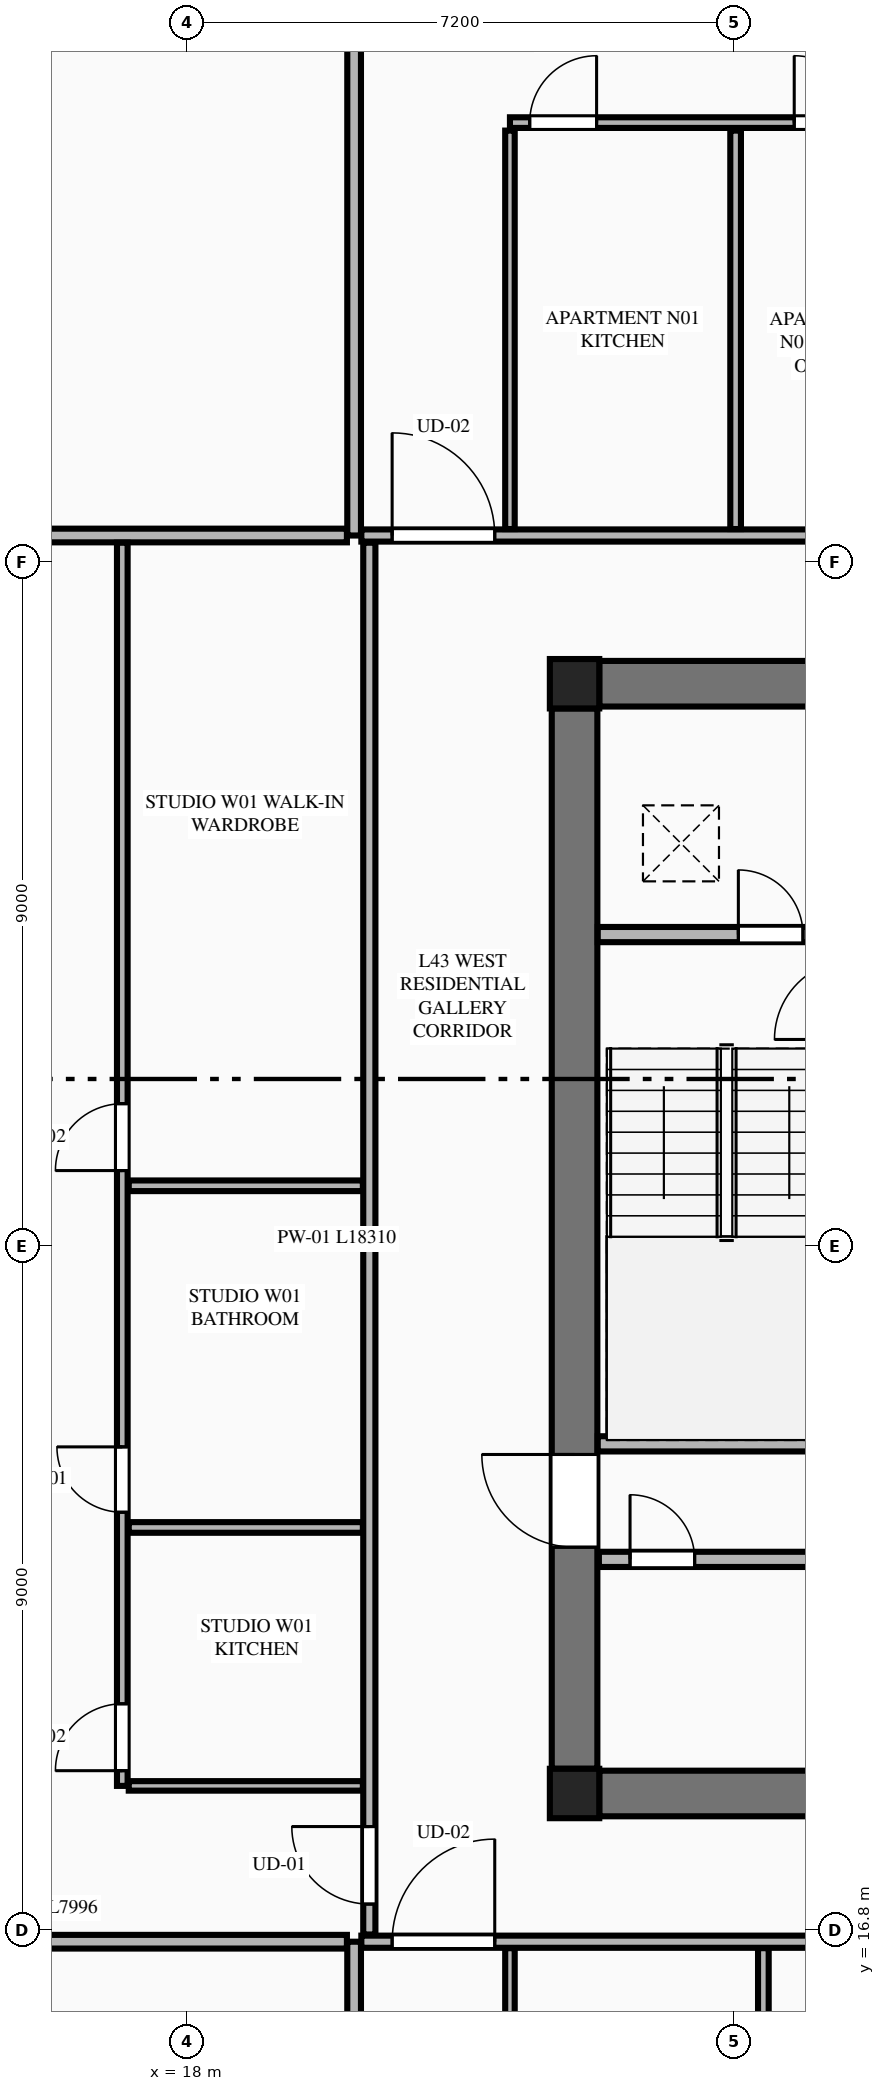
"""IFC4 building model, lengths in metres.
Left out: names, types, materials, properties, quantities, classifications, styles, units other than length and angle.
Written with IfcOpenShell. Run it as: python <this file> out.ifc"""

import sys

from ifc_helpers import new_model, si_unit, direction, frame, frame_2d, origin, origin_2d, place, context, subcontext, project, spatial, rectangle, extrude, element, fill, save


model = new_model("IFC4")
c1 = context("Model", 3, precision=1e-05, world=origin(), true_north=direction((0.0, 1.0)))
c2 = subcontext(c1, "Body", "Model", "MODEL_VIEW")
j1 = project(units=[si_unit("LENGTHUNIT", "METRE"), si_unit("PLANEANGLEUNIT", "RADIAN")], contexts=[c1])
p1 = place(None, origin())
s1 = spatial("IfcSite", under=j1, at=p1, CompositionType="ELEMENT")
p2 = place(p1, origin())
s2 = spatial("IfcBuilding", under=s1, at=p2, CompositionType="ELEMENT")
p3 = place(p2, frame((0.0, 0.0, 164.15)))
s3 = spatial("IfcBuildingStorey", under=s2, at=p3, CompositionType="ELEMENT", Elevation=164.15)
for number, where, z_axis, x_axis in (
    (1, (23.1, 18.6, 0.0), (0.0, 0.0, 1.0), (1.0, 0.0, 0.0)),
    (2, (23.1, 33.2, 0.0), (0.0, 0.0, 1.0), (1.0, 0.0, 0.0)),
):
    element("IfcColumn", number, at=place(p3, frame(where, z_axis=z_axis, x_axis=x_axis)), inside=s3, PredefinedType="COLUMN", context=c2, shape_type="SweptSolid", body=[
        extrude(rectangle(XDim=0.65, YDim=0.65, at=origin_2d()), origin(), (0.0, 0.0, 1.0), 3.55),
    ])
for number, where, z_axis, x_axis in (
    (3, (23.425, 18.6, 0.0), (0.0, 0.0, 1.0), (1.0, 0.0, 0.0)),
    (4, (23.425, 33.2, 0.0), (0.0, 0.0, 1.0), (1.0, 0.0, 0.0)),
):
    element("IfcWall", number, at=place(p3, frame(where, z_axis=z_axis, x_axis=x_axis)), inside=s3, PredefinedType="SHEAR", context=c2, shape_type="SweptSolid", body=[
        extrude(rectangle(XDim=17.95, YDim=0.6, at=frame_2d((8.975, 0.0))), origin(), (0.0, 0.0, 1.0), 3.34),
    ])
p4 = place(p3, frame((23.1, 18.925, 0.0), z_axis=(0.0, 0.0, 1.0), x_axis=(0.0, 1.0, 0.0)))
e5 = element("IfcWall", 5, at=p4, inside=s3, PredefinedType="SHEAR", context=c2, shape_type="SweptSolid", body=[
    extrude(rectangle(XDim=13.95, YDim=0.6, at=frame_2d((6.975, 0.0))), origin(), (0.0, 0.0, 1.0), 3.34),
])
p5 = place(p4, frame((2.915, 0.0, 0.0)))
e6 = element("IfcOpeningElement", 6, at=p5, cuts=e5, PredefinedType="OPENING", context=c2, shape_type="SweptSolid", body=[
    extrude(rectangle(XDim=1.22, YDim=2.25, at=frame_2d((0.61, 1.125))), frame((0.0, 0.31, 0.0), z_axis=(0.0, -1.0, 0.0), x_axis=(1.0, 0.0, 0.0)), (0.0, 0.0, 1.0), 0.62),
])
p6 = place(p3, frame((23.405, 23.2, 0.0), z_axis=(0.0, 0.0, 1.0), x_axis=(1.0, 0.0, 0.0)))
e7 = element("IfcWall", 7, at=p6, inside=s3, PredefinedType="PLUMBINGWALL", context=c2, shape_type="SweptSolid", body=[
    extrude(rectangle(XDim=3.27, YDim=0.2, at=frame_2d((1.635, 0.0))), origin(), (0.0, 0.0, 1.0), 3.34),
])
p7 = place(p3, frame((23.405, 29.9, 0.0), z_axis=(0.0, 0.0, 1.0), x_axis=(1.0, 0.0, 0.0)))
e8 = element("IfcWall", 8, at=p7, inside=s3, PredefinedType="PLUMBINGWALL", context=c2, shape_type="SweptSolid", body=[
    extrude(rectangle(XDim=3.27, YDim=0.2, at=frame_2d((1.635, 0.0))), origin(), (0.0, 0.0, 1.0), 3.34),
])
p8 = place(p7, frame((1.85, 0.0, 0.0)))
e9 = element("IfcOpeningElement", 9, at=p8, cuts=e8, PredefinedType="OPENING", context=c2, shape_type="SweptSolid", body=[
    extrude(rectangle(XDim=0.85, YDim=2.05, at=frame_2d((0.425, 1.025))), frame((0.0, 0.11, 0.0), z_axis=(0.0, -1.0, 0.0), x_axis=(1.0, 0.0, 0.0)), (0.0, 0.0, 1.0), 0.22),
])
p9 = place(p3, frame((23.42, 21.68, 0.0), z_axis=(0.0, 0.0, 1.0), x_axis=(1.0, 0.0, 0.0)))
e10 = element("IfcWall", 10, at=p9, inside=s3, PredefinedType="PLUMBINGWALL", context=c2, shape_type="SweptSolid", body=[
    extrude(rectangle(XDim=17.96, YDim=0.2, at=frame_2d((8.98, 0.0))), origin(), (0.0, 0.0, 1.0), 3.34),
])
p10 = place(p9, frame((11.6, 0.0, 0.0)))
e11 = element("IfcOpeningElement", 11, at=p10, cuts=e10, PredefinedType="OPENING", context=c2, shape_type="SweptSolid", body=[
    extrude(rectangle(XDim=1.1, YDim=2.2, at=frame_2d((0.55, 1.1))), frame((0.0, 0.11, 0.0), z_axis=(0.0, -1.0, 0.0), x_axis=(1.0, 0.0, 0.0)), (0.0, 0.0, 1.0), 0.22),
])
p11 = place(p9, frame((0.41, 0.0, 0.0)))
e12 = element("IfcOpeningElement", 12, at=p11, cuts=e10, PredefinedType="OPENING", context=c2, shape_type="SweptSolid", body=[
    extrude(rectangle(XDim=0.85, YDim=2.05, at=frame_2d((0.425, 1.025))), frame((0.0, 0.11, 0.0), z_axis=(0.0, -1.0, 0.0), x_axis=(1.0, 0.0, 0.0)), (0.0, 0.0, 1.0), 0.22),
])
p12 = place(p9, frame((4.13, 0.0, 0.0)))
e13 = element("IfcOpeningElement", 13, at=p12, cuts=e10, PredefinedType="OPENING", context=c2, shape_type="SweptSolid", body=[
    extrude(rectangle(XDim=0.85, YDim=2.05, at=frame_2d((0.425, 1.025))), frame((0.0, 0.11, 0.0), z_axis=(0.0, -1.0, 0.0), x_axis=(1.0, 0.0, 0.0)), (0.0, 0.0, 1.0), 0.22),
])
p13 = place(p9, frame((7.83, 0.0, 0.0)))
e14 = element("IfcOpeningElement", 14, at=p13, cuts=e10, PredefinedType="OPENING", context=c2, shape_type="SweptSolid", body=[
    extrude(rectangle(XDim=0.85, YDim=2.05, at=frame_2d((0.425, 1.025))), frame((0.0, 0.11, 0.0), z_axis=(0.0, -1.0, 0.0), x_axis=(1.0, 0.0, 0.0)), (0.0, 0.0, 1.0), 0.22),
])
p14 = place(p9, frame((13.78, 0.0, 0.0)))
e15 = element("IfcOpeningElement", 15, at=p14, cuts=e10, PredefinedType="OPENING", context=c2, shape_type="SweptSolid", body=[
    extrude(rectangle(XDim=0.85, YDim=2.05, at=frame_2d((0.425, 1.025))), frame((0.0, 0.11, 0.0), z_axis=(0.0, -1.0, 0.0), x_axis=(1.0, 0.0, 0.0)), (0.0, 0.0, 1.0), 0.22),
])
p15 = place(p9, frame((16.13, 0.0, 0.0)))
e16 = element("IfcOpeningElement", 16, at=p15, cuts=e10, PredefinedType="OPENING", context=c2, shape_type="SweptSolid", body=[
    extrude(rectangle(XDim=0.85, YDim=2.05, at=frame_2d((0.425, 1.025))), frame((0.0, 0.11, 0.0), z_axis=(0.0, -1.0, 0.0), x_axis=(1.0, 0.0, 0.0)), (0.0, 0.0, 1.0), 0.22),
])
p16 = place(p3, frame((16.863, 44.823, 0.0), z_axis=(0.0, 0.0, 1.0), x_axis=(-0.451595734115, -0.892222670038, 0.0)))
e17 = element("IfcWall", 17, at=p16, inside=s3, PredefinedType="STANDARD", context=c2, shape_type="SweptSolid", body=[
    extrude(rectangle(XDim=5.208, YDim=0.34, at=frame_2d((2.604, 0.0))), origin(), (0.0, 0.0, 1.0), 2.797),
])
p17 = place(p16, frame((2.054, 0.0, 0.75)))
e18 = element("IfcOpeningElement", 18, at=p17, cuts=e17, PredefinedType="OPENING", context=c2, shape_type="SweptSolid", body=[
    extrude(rectangle(XDim=1.1, YDim=1.897, at=frame_2d((0.55, 0.948))), frame((0.0, 0.18, 0.0), z_axis=(0.0, -1.0, 0.0), x_axis=(1.0, 0.0, 0.0)), (0.0, 0.0, 1.0), 0.36),
])
p18 = place(p3, frame((20.2, 4.105, 0.0), z_axis=(0.0, 0.0, 1.0), x_axis=(0.0, 1.0, 0.0)))
e19 = element("IfcWall", 19, at=p18, inside=s3, PredefinedType="PARTITIONING", context=c2, shape_type="SweptSolid", body=[
    extrude(rectangle(XDim=12.545, YDim=0.18, at=frame_2d((6.272, 0.0))), origin(), (0.0, 0.0, 1.0), 3.34),
])
p19 = place(p3, frame((20.295, 16.65, 0.0), z_axis=(0.0, 0.0, 1.0), x_axis=(1.0, 0.0, 0.0)))
e20 = element("IfcWall", 20, at=p19, inside=s3, PredefinedType="PARTITIONING", context=c2, shape_type="SweptSolid", body=[
    extrude(rectangle(XDim=24.21, YDim=0.16, at=frame_2d((12.105, 0.0))), origin(), (0.0, 0.0, 1.0), 3.34),
])
p20 = place(p19, frame((0.405, 0.0, 0.0)))
e21 = element("IfcOpeningElement", 21, at=p20, cuts=e20, PredefinedType="OPENING", context=c2, shape_type="SweptSolid", body=[
    extrude(rectangle(XDim=1.35, YDim=2.35, at=frame_2d((0.675, 1.175))), frame((0.0, 0.09, 0.0), z_axis=(0.0, -1.0, 0.0), x_axis=(1.0, 0.0, 0.0)), (0.0, 0.0, 1.0), 0.18),
])
p21 = place(p3, frame((22.25, 11.612, 0.0), z_axis=(0.0, 0.0, 1.0), x_axis=(0.0, 1.0, 0.0)))
e22 = element("IfcWall", 22, at=p21, inside=s3, PredefinedType="PARTITIONING", context=c2, shape_type="SweptSolid", body=[
    extrude(rectangle(XDim=4.953, YDim=0.125, at=frame_2d((2.477, 0.0))), origin(), (0.0, 0.0, 1.0), 2.722),
])
p22 = place(p3, frame((25.584, 11.612, 0.0), z_axis=(0.0, 0.0, 1.0), x_axis=(0.0, 1.0, 0.0)))
e23 = element("IfcWall", 23, at=p22, inside=s3, PredefinedType="PLUMBINGWALL", context=c2, shape_type="SweptSolid", body=[
    extrude(rectangle(XDim=4.953, YDim=0.14, at=frame_2d((2.477, 0.0))), origin(), (0.0, 0.0, 1.0), 3.34),
])
p23 = place(p3, frame((20.2, 35.15, 0.0), z_axis=(0.0, 0.0, 1.0), x_axis=(0.0, 1.0, 0.0)))
e24 = element("IfcWall", 24, at=p23, inside=s3, PredefinedType="PARTITIONING", context=c2, shape_type="SweptSolid", body=[
    extrude(rectangle(XDim=12.345, YDim=0.18, at=frame_2d((6.173, 0.0))), origin(), (0.0, 0.0, 1.0), 3.34),
])
p24 = place(p3, frame((20.295, 35.15, 0.0), z_axis=(0.0, 0.0, 1.0), x_axis=(1.0, 0.0, 0.0)))
e25 = element("IfcWall", 25, at=p24, inside=s3, PredefinedType="PARTITIONING", context=c2, shape_type="SweptSolid", body=[
    extrude(rectangle(XDim=24.21, YDim=0.16, at=frame_2d((12.105, 0.0))), origin(), (0.0, 0.0, 1.0), 3.34),
])
p25 = place(p24, frame((0.405, 0.0, 0.0)))
e26 = element("IfcOpeningElement", 26, at=p25, cuts=e25, PredefinedType="OPENING", context=c2, shape_type="SweptSolid", body=[
    extrude(rectangle(XDim=1.35, YDim=2.35, at=frame_2d((0.675, 1.175))), frame((0.0, 0.09, 0.0), z_axis=(0.0, -1.0, 0.0), x_axis=(1.0, 0.0, 0.0)), (0.0, 0.0, 1.0), 0.18),
])
p26 = place(p3, frame((22.25, 35.235, 0.0), z_axis=(0.0, 0.0, 1.0), x_axis=(0.0, 1.0, 0.0)))
e27 = element("IfcWall", 27, at=p26, inside=s3, PredefinedType="PARTITIONING", context=c2, shape_type="SweptSolid", body=[
    extrude(rectangle(XDim=5.242, YDim=0.125, at=frame_2d((2.621, 0.0))), origin(), (0.0, 0.0, 1.0), 2.722),
])
p27 = place(p3, frame((22.25, 40.582, 0.0), z_axis=(0.0, 0.0, 1.0), x_axis=(1.0, 0.0, 0.0)))
e28 = element("IfcWall", 28, at=p27, inside=s3, PredefinedType="PLUMBINGWALL", context=c2, shape_type="SweptSolid", body=[
    extrude(rectangle(XDim=7.812, YDim=0.14, at=frame_2d((3.906, 0.0))), origin(), (0.0, 0.0, 1.0), 3.34),
])
p28 = place(p27, frame((6.176, 0.0, 0.0)))
e29 = element("IfcOpeningElement", 29, at=p28, cuts=e28, PredefinedType="OPENING", context=c2, shape_type="SweptSolid", body=[
    extrude(rectangle(XDim=0.86, YDim=2.1, at=frame_2d((0.43, 1.05))), frame((0.0, 0.08, 0.0), z_axis=(0.0, -1.0, 0.0), x_axis=(1.0, 0.0, 0.0)), (0.0, 0.0, 1.0), 0.16),
])
p29 = place(p27, frame((0.26, 0.0, 0.0)))
e30 = element("IfcOpeningElement", 30, at=p29, cuts=e28, PredefinedType="OPENING", context=c2, shape_type="SweptSolid", body=[
    extrude(rectangle(XDim=0.88, YDim=2.15, at=frame_2d((0.44, 1.075))), frame((0.0, 0.08, 0.0), z_axis=(0.0, -1.0, 0.0), x_axis=(1.0, 0.0, 0.0)), (0.0, 0.0, 1.0), 0.16),
])
p30 = place(p27, frame((3.74, 0.0, 0.0)))
e31 = element("IfcOpeningElement", 31, at=p30, cuts=e28, PredefinedType="OPENING", context=c2, shape_type="SweptSolid", body=[
    extrude(rectangle(XDim=0.88, YDim=2.15, at=frame_2d((0.44, 1.075))), frame((0.0, 0.08, 0.0), z_axis=(0.0, -1.0, 0.0), x_axis=(1.0, 0.0, 0.0)), (0.0, 0.0, 1.0), 0.16),
])
p31 = place(p3, frame((25.219, 35.235, 0.0), z_axis=(0.0, 0.0, 1.0), x_axis=(0.0, 1.0, 0.0)))
e32 = element("IfcWall", 32, at=p31, inside=s3, PredefinedType="PLUMBINGWALL", context=c2, shape_type="SweptSolid", body=[
    extrude(rectangle(XDim=5.242, YDim=0.14, at=frame_2d((2.621, 0.0))), origin(), (0.0, 0.0, 1.0), 3.34),
])
p32 = place(p3, frame((12.109, 16.65, 0.0), z_axis=(0.0, 0.0, 1.0), x_axis=(1.0, 0.0, 0.0)))
e33 = element("IfcWall", 33, at=p32, inside=s3, PredefinedType="PARTITIONING", context=c2, shape_type="SweptSolid", body=[
    extrude(rectangle(XDim=7.996, YDim=0.18, at=frame_2d((3.998, 0.0))), origin(), (0.0, 0.0, 1.0), 3.34),
])
p33 = place(p3, frame((12.21, 35.15, 0.0), z_axis=(0.0, 0.0, 1.0), x_axis=(1.0, 0.0, 0.0)))
e34 = element("IfcWall", 34, at=p33, inside=s3, PredefinedType="PARTITIONING", context=c2, shape_type="SweptSolid", body=[
    extrude(rectangle(XDim=7.895, YDim=0.18, at=frame_2d((3.948, 0.0))), origin(), (0.0, 0.0, 1.0), 3.34),
])
p34 = place(p3, frame((20.4, 16.745, 0.0), z_axis=(0.0, 0.0, 1.0), x_axis=(0.0, 1.0, 0.0)))
e35 = element("IfcWall", 35, at=p34, inside=s3, PredefinedType="PARTITIONING", context=c2, shape_type="SweptSolid", body=[
    extrude(rectangle(XDim=18.31, YDim=0.16, at=frame_2d((9.155, 0.0))), origin(), (0.0, 0.0, 1.0), 3.34),
])
p35 = place(p34, frame((0.4, 0.0, 0.0)))
e36 = element("IfcOpeningElement", 36, at=p35, cuts=e35, PredefinedType="OPENING", context=c2, shape_type="SweptSolid", body=[
    extrude(rectangle(XDim=1.02, YDim=2.25, at=frame_2d((0.51, 1.125))), frame((0.0, 0.09, 0.0), z_axis=(0.0, -1.0, 0.0), x_axis=(1.0, 0.0, 0.0)), (0.0, 0.0, 1.0), 0.18),
])
p36 = place(p3, frame((17.235, 18.7, 0.0), z_axis=(0.0, 0.0, 1.0), x_axis=(1.0, 0.0, 0.0)))
e37 = element("IfcWall", 37, at=p36, inside=s3, PredefinedType="PARTITIONING", context=c2, shape_type="SweptSolid", body=[
    extrude(rectangle(XDim=3.08, YDim=0.125, at=frame_2d((1.54, 0.0))), origin(), (0.0, 0.0, 1.0), 2.722),
])
p37 = place(p3, frame((17.15, 18.7, 0.0), z_axis=(0.0, 0.0, 1.0), x_axis=(0.0, 1.0, 0.0)))
e38 = element("IfcWall", 38, at=p37, inside=s3, PredefinedType="PLUMBINGWALL", context=c2, shape_type="SweptSolid", body=[
    extrude(rectangle(XDim=16.355, YDim=0.14, at=frame_2d((8.177, 0.0))), origin(), (0.0, 0.0, 1.0), 3.34),
])
p38 = place(p37, frame((3.6, 0.0, 0.0)))
e39 = element("IfcOpeningElement", 39, at=p38, cuts=e38, PredefinedType="OPENING", context=c2, shape_type="SweptSolid", body=[
    extrude(rectangle(XDim=0.86, YDim=2.1, at=frame_2d((0.43, 1.05))), frame((0.0, 0.08, 0.0), z_axis=(0.0, -1.0, 0.0), x_axis=(1.0, 0.0, 0.0)), (0.0, 0.0, 1.0), 0.16),
])
p39 = place(p37, frame((8.095, 0.0, 0.0)))
e40 = element("IfcOpeningElement", 40, at=p39, cuts=e38, PredefinedType="OPENING", context=c2, shape_type="SweptSolid", body=[
    extrude(rectangle(XDim=0.88, YDim=2.15, at=frame_2d((0.44, 1.075))), frame((0.0, 0.08, 0.0), z_axis=(0.0, -1.0, 0.0), x_axis=(1.0, 0.0, 0.0)), (0.0, 0.0, 1.0), 0.16),
])
p40 = place(p37, frame((0.2, 0.0, 0.0)))
e41 = element("IfcOpeningElement", 41, at=p40, cuts=e38, PredefinedType="OPENING", context=c2, shape_type="SweptSolid", body=[
    extrude(rectangle(XDim=0.88, YDim=2.15, at=frame_2d((0.44, 1.075))), frame((0.0, 0.08, 0.0), z_axis=(0.0, -1.0, 0.0), x_axis=(1.0, 0.0, 0.0)), (0.0, 0.0, 1.0), 0.16),
])
for number, where, z_axis, x_axis in (
    (42, (17.235, 22.1, 0.0), (0.0, 0.0, 1.0), (1.0, 0.0, 0.0)),
    (43, (17.235, 26.595, 0.0), (0.0, 0.0, 1.0), (1.0, 0.0, 0.0)),
):
    element("IfcWall", number, at=place(p3, frame(where, z_axis=z_axis, x_axis=x_axis)), inside=s3, PredefinedType="PLUMBINGWALL", context=c2, shape_type="SweptSolid", body=[
        extrude(rectangle(XDim=3.08, YDim=0.14, at=frame_2d((1.54, 0.0))), origin(), (0.0, 0.0, 1.0), 3.34),
    ])
p41 = place(p5, origin())
e44 = element("IfcDoor", 44, at=p41, inside=s3, OperationType="SINGLE_SWING_RIGHT", PredefinedType="DOOR", context=c2, shape_type="SweptSolid", body=[
    extrude(rectangle(XDim=1.22, YDim=2.25, at=frame_2d((0.61, 1.125))), frame((0.0, 0.025, 0.0), z_axis=(0.0, -1.0, 0.0), x_axis=(1.0, 0.0, 0.0)), (0.0, 0.0, 1.0), 0.05),
])
fill(e6, e44)
p42 = place(p8, origin())
e45 = element("IfcDoor", 45, at=p42, inside=s3, OperationType="SINGLE_SWING_LEFT", PredefinedType="DOOR", context=c2, shape_type="SweptSolid", body=[
    extrude(rectangle(XDim=0.85, YDim=2.05, at=frame_2d((0.425, 1.025))), frame((0.0, 0.025, 0.0), z_axis=(0.0, -1.0, 0.0), x_axis=(1.0, 0.0, 0.0)), (0.0, 0.0, 1.0), 0.05),
])
fill(e9, e45)
p43 = place(p11, origin())
e46 = element("IfcDoor", 46, at=p43, inside=s3, OperationType="SINGLE_SWING_LEFT", PredefinedType="DOOR", context=c2, shape_type="SweptSolid", body=[
    extrude(rectangle(XDim=0.85, YDim=2.05, at=frame_2d((0.425, 1.025))), frame((0.0, 0.025, 0.0), z_axis=(0.0, -1.0, 0.0), x_axis=(1.0, 0.0, 0.0)), (0.0, 0.0, 1.0), 0.05),
])
fill(e12, e46)
p44 = place(p20, origin())
e47 = element("IfcDoor", 47, at=p44, inside=s3, OperationType="SINGLE_SWING_RIGHT", PredefinedType="DOOR", context=c2, shape_type="SweptSolid", body=[
    extrude(rectangle(XDim=1.35, YDim=2.35, at=frame_2d((0.675, 1.175))), frame((0.0, 0.025, 0.0), z_axis=(0.0, -1.0, 0.0), x_axis=(1.0, 0.0, 0.0)), (0.0, 0.0, 1.0), 0.05),
])
fill(e21, e47)
p45 = place(p25, origin())
e48 = element("IfcDoor", 48, at=p45, inside=s3, OperationType="SINGLE_SWING_LEFT", PredefinedType="DOOR", context=c2, shape_type="SweptSolid", body=[
    extrude(rectangle(XDim=1.35, YDim=2.35, at=frame_2d((0.675, 1.175))), frame((0.0, 0.025, 0.0), z_axis=(0.0, -1.0, 0.0), x_axis=(1.0, 0.0, 0.0)), (0.0, 0.0, 1.0), 0.05),
])
fill(e26, e48)
p46 = place(p29, origin())
e49 = element("IfcDoor", 49, at=p46, inside=s3, OperationType="SINGLE_SWING_RIGHT", PredefinedType="DOOR", context=c2, shape_type="SweptSolid", body=[
    extrude(rectangle(XDim=0.88, YDim=2.15, at=frame_2d((0.44, 1.075))), frame((0.0, 0.025, 0.0), z_axis=(0.0, -1.0, 0.0), x_axis=(1.0, 0.0, 0.0)), (0.0, 0.0, 1.0), 0.05),
])
fill(e30, e49)
p47 = place(p30, origin())
e50 = element("IfcDoor", 50, at=p47, inside=s3, OperationType="SINGLE_SWING_LEFT", PredefinedType="DOOR", context=c2, shape_type="SweptSolid", body=[
    extrude(rectangle(XDim=0.88, YDim=2.15, at=frame_2d((0.44, 1.075))), frame((0.0, 0.025, 0.0), z_axis=(0.0, -1.0, 0.0), x_axis=(1.0, 0.0, 0.0)), (0.0, 0.0, 1.0), 0.05),
])
fill(e31, e50)
p48 = place(p38, origin())
e51 = element("IfcDoor", 51, at=p48, inside=s3, OperationType="SINGLE_SWING_RIGHT", PredefinedType="DOOR", context=c2, shape_type="SweptSolid", body=[
    extrude(rectangle(XDim=0.86, YDim=2.1, at=frame_2d((0.43, 1.05))), frame((0.0, 0.025, 0.0), z_axis=(0.0, -1.0, 0.0), x_axis=(1.0, 0.0, 0.0)), (0.0, 0.0, 1.0), 0.05),
])
fill(e39, e51)
p49 = place(p39, origin())
e52 = element("IfcDoor", 52, at=p49, inside=s3, OperationType="SINGLE_SWING_LEFT", PredefinedType="DOOR", context=c2, shape_type="SweptSolid", body=[
    extrude(rectangle(XDim=0.88, YDim=2.15, at=frame_2d((0.44, 1.075))), frame((0.0, 0.025, 0.0), z_axis=(0.0, -1.0, 0.0), x_axis=(1.0, 0.0, 0.0)), (0.0, 0.0, 1.0), 0.05),
])
fill(e40, e52)
p50 = place(p35, origin())
e53 = element("IfcDoor", 53, at=p50, inside=s3, OperationType="SINGLE_SWING_RIGHT", PredefinedType="DOOR", context=c2, shape_type="SweptSolid", body=[
    extrude(rectangle(XDim=1.02, YDim=2.25, at=frame_2d((0.51, 1.125))), frame((0.0, 0.025, 0.0), z_axis=(0.0, -1.0, 0.0), x_axis=(1.0, 0.0, 0.0)), (0.0, 0.0, 1.0), 0.05),
])
fill(e36, e53)
p51 = place(p40, origin())
e54 = element("IfcDoor", 54, at=p51, inside=s3, OperationType="SINGLE_SWING_LEFT", PredefinedType="DOOR", context=c2, shape_type="SweptSolid", body=[
    extrude(rectangle(XDim=0.88, YDim=2.15, at=frame_2d((0.44, 1.075))), frame((0.0, 0.025, 0.0), z_axis=(0.0, -1.0, 0.0), x_axis=(1.0, 0.0, 0.0)), (0.0, 0.0, 1.0), 0.05),
])
fill(e41, e54)
save(model, sys.argv[1])
